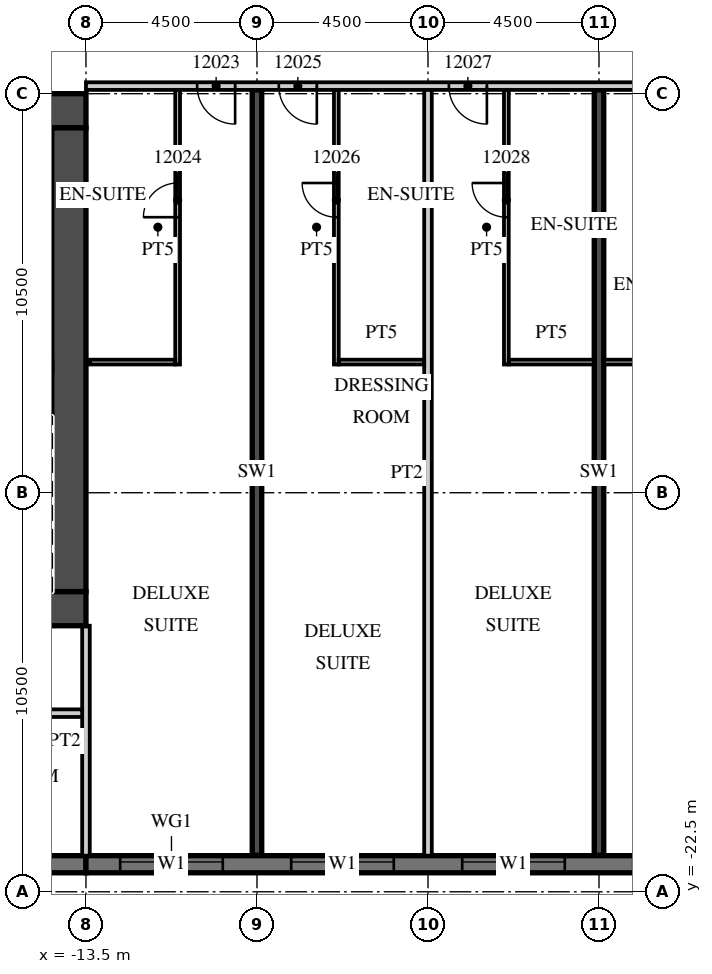
"""IFC4 building model, lengths in metres.
Left out: names, types, materials, properties, quantities, classifications, styles, units other than length and angle.
Written with IfcOpenShell. Run it as: python <this file> out.ifc"""

import sys

from ifc_helpers import new_model, si_unit, direction, frame, frame_2d, origin, place, context, subcontext, project, spatial, rectangle, extrude, element, fill, save


model = new_model("IFC4")
c1 = context("Model", 3, precision=1e-05, world=origin(), true_north=direction((0.0, 1.0)))
c2 = subcontext(c1, "Body", "Model", "MODEL_VIEW")
j1 = project(units=[si_unit("LENGTHUNIT", "METRE"), si_unit("PLANEANGLEUNIT", "RADIAN")], contexts=[c1])
p1 = place(None, origin())
s1 = spatial("IfcSite", under=j1, at=p1, CompositionType="ELEMENT")
p2 = place(p1, origin())
s2 = spatial("IfcBuilding", under=s1, at=p2, CompositionType="ELEMENT")
p3 = place(p2, frame((0.0, 0.0, 69.9)))
s3 = spatial("IfcBuildingStorey", under=s2, at=p3, CompositionType="ELEMENT", Elevation=69.9)
for number, where, z_axis, x_axis in (
    (1, (-9.0, -21.54, 0.0), (0.0, 0.0, 1.0), (0.0, 1.0, 0.0)),
    (2, (0.0, -21.54, 0.0), (0.0, 0.0, 1.0), (0.0, 1.0, 0.0)),
):
    element("IfcWall", number, at=place(p3, frame(where, z_axis=z_axis, x_axis=x_axis)), inside=s3, PredefinedType="SHEAR", context=c2, shape_type="SweptSolid", body=[
        extrude(rectangle(XDim=20.14, YDim=0.25, at=frame_2d((10.07, 0.0))), origin(), (0.0, 0.0, 1.0), 3.3),
    ])
p4 = place(p3, frame((-31.5, -21.775, 0.0), z_axis=(0.0, 0.0, 1.0), x_axis=(1.0, 0.0, 0.0)))
e3 = element("IfcWall", 3, at=p4, inside=s3, PredefinedType="SOLIDWALL", context=c2, shape_type="SweptSolid", body=[
    extrude(rectangle(XDim=18.0, YDim=0.45, at=frame_2d((9.0, 0.0))), origin(), (0.0, 0.0, 1.0), 3.02),
])
p5 = place(p3, frame((-13.5, -21.775, 0.0), z_axis=(0.0, 0.0, 1.0), x_axis=(1.0, 0.0, 0.0)))
e4 = element("IfcWall", 4, at=p5, inside=s3, PredefinedType="SOLIDWALL", context=c2, shape_type="SweptSolid", body=[
    extrude(rectangle(XDim=54.5, YDim=0.45, at=frame_2d((27.25, 0.0))), origin(), (0.0, 0.0, 1.0), 3.02),
])
p6 = place(p5, frame((0.9, 0.0, 0.45)))
e5 = element("IfcOpeningElement", 5, at=p6, cuts=e4, PredefinedType="OPENING", context=c2, shape_type="SweptSolid", body=[
    extrude(rectangle(XDim=2.7, YDim=2.25, at=frame_2d((1.35, 1.125))), frame((0.0, 0.235, 0.0), z_axis=(0.0, -1.0, 0.0), x_axis=(1.0, 0.0, 0.0)), (0.0, 0.0, 1.0), 0.47),
])
p7 = place(p5, frame((5.4, 0.0, 0.45)))
e6 = element("IfcOpeningElement", 6, at=p7, cuts=e4, PredefinedType="OPENING", context=c2, shape_type="SweptSolid", body=[
    extrude(rectangle(XDim=2.7, YDim=2.25, at=frame_2d((1.35, 1.125))), frame((0.0, 0.235, 0.0), z_axis=(0.0, -1.0, 0.0), x_axis=(1.0, 0.0, 0.0)), (0.0, 0.0, 1.0), 0.47),
])
p8 = place(p5, frame((9.9, 0.0, 0.45)))
e7 = element("IfcOpeningElement", 7, at=p8, cuts=e4, PredefinedType="OPENING", context=c2, shape_type="SweptSolid", body=[
    extrude(rectangle(XDim=2.7, YDim=2.25, at=frame_2d((1.35, 1.125))), frame((0.0, 0.235, 0.0), z_axis=(0.0, -1.0, 0.0), x_axis=(1.0, 0.0, 0.0)), (0.0, 0.0, 1.0), 0.47),
])
p9 = place(p5, frame((14.4, 0.0, 0.45)))
e8 = element("IfcOpeningElement", 8, at=p9, cuts=e4, PredefinedType="OPENING", context=c2, shape_type="SweptSolid", body=[
    extrude(rectangle(XDim=2.7, YDim=2.25, at=frame_2d((1.35, 1.125))), frame((0.0, 0.235, 0.0), z_axis=(0.0, -1.0, 0.0), x_axis=(1.0, 0.0, 0.0)), (0.0, 0.0, 1.0), 0.47),
])
p10 = place(p5, frame((18.9, 0.0, 0.45)))
e9 = element("IfcOpeningElement", 9, at=p10, cuts=e4, PredefinedType="OPENING", context=c2, shape_type="SweptSolid", body=[
    extrude(rectangle(XDim=2.7, YDim=2.25, at=frame_2d((1.35, 1.125))), frame((0.0, 0.235, 0.0), z_axis=(0.0, -1.0, 0.0), x_axis=(1.0, 0.0, 0.0)), (0.0, 0.0, 1.0), 0.47),
])
p11 = place(p5, frame((23.4, 0.0, 0.45)))
e10 = element("IfcOpeningElement", 10, at=p11, cuts=e4, PredefinedType="OPENING", context=c2, shape_type="SweptSolid", body=[
    extrude(rectangle(XDim=2.7, YDim=2.25, at=frame_2d((1.35, 1.125))), frame((0.0, 0.235, 0.0), z_axis=(0.0, -1.0, 0.0), x_axis=(1.0, 0.0, 0.0)), (0.0, 0.0, 1.0), 0.47),
])
p12 = place(p5, frame((27.9, 0.0, 0.45)))
e11 = element("IfcOpeningElement", 11, at=p12, cuts=e4, PredefinedType="OPENING", context=c2, shape_type="SweptSolid", body=[
    extrude(rectangle(XDim=2.7, YDim=2.25, at=frame_2d((1.35, 1.125))), frame((0.0, 0.235, 0.0), z_axis=(0.0, -1.0, 0.0), x_axis=(1.0, 0.0, 0.0)), (0.0, 0.0, 1.0), 0.47),
])
p13 = place(p5, frame((32.4, 0.0, 0.45)))
e12 = element("IfcOpeningElement", 12, at=p13, cuts=e4, PredefinedType="OPENING", context=c2, shape_type="SweptSolid", body=[
    extrude(rectangle(XDim=2.7, YDim=2.25, at=frame_2d((1.35, 1.125))), frame((0.0, 0.235, 0.0), z_axis=(0.0, -1.0, 0.0), x_axis=(1.0, 0.0, 0.0)), (0.0, 0.0, 1.0), 0.47),
])
p14 = place(p5, frame((36.9, 0.0, 0.45)))
e13 = element("IfcOpeningElement", 13, at=p14, cuts=e4, PredefinedType="OPENING", context=c2, shape_type="SweptSolid", body=[
    extrude(rectangle(XDim=2.7, YDim=2.25, at=frame_2d((1.35, 1.125))), frame((0.0, 0.235, 0.0), z_axis=(0.0, -1.0, 0.0), x_axis=(1.0, 0.0, 0.0)), (0.0, 0.0, 1.0), 0.47),
])
p15 = place(p5, frame((41.4, 0.0, 0.45)))
e14 = element("IfcOpeningElement", 14, at=p15, cuts=e4, PredefinedType="OPENING", context=c2, shape_type="SweptSolid", body=[
    extrude(rectangle(XDim=2.7, YDim=2.25, at=frame_2d((1.35, 1.125))), frame((0.0, 0.235, 0.0), z_axis=(0.0, -1.0, 0.0), x_axis=(1.0, 0.0, 0.0)), (0.0, 0.0, 1.0), 0.47),
])
p16 = place(p5, frame((45.9, 0.0, 0.45)))
e15 = element("IfcOpeningElement", 15, at=p16, cuts=e4, PredefinedType="OPENING", context=c2, shape_type="SweptSolid", body=[
    extrude(rectangle(XDim=2.7, YDim=2.25, at=frame_2d((1.35, 1.125))), frame((0.0, 0.235, 0.0), z_axis=(0.0, -1.0, 0.0), x_axis=(1.0, 0.0, 0.0)), (0.0, 0.0, 1.0), 0.47),
])
p17 = place(p5, frame((50.4, 0.0, 0.45)))
e16 = element("IfcOpeningElement", 16, at=p17, cuts=e4, PredefinedType="OPENING", context=c2, shape_type="SweptSolid", body=[
    extrude(rectangle(XDim=2.7, YDim=2.25, at=frame_2d((1.35, 1.125))), frame((0.0, 0.235, 0.0), z_axis=(0.0, -1.0, 0.0), x_axis=(1.0, 0.0, 0.0)), (0.0, 0.0, 1.0), 0.47),
])
p18 = place(p3, frame((-13.5, -21.55, 0.0), z_axis=(0.0, 0.0, 1.0), x_axis=(0.0, 1.0, 0.0)))
e17 = element("IfcWall", 17, at=p18, inside=s3, PredefinedType="PARTITIONING", context=c2, shape_type="SweptSolid", body=[
    extrude(rectangle(XDim=6.05, YDim=0.2, at=frame_2d((3.025, 0.0))), origin(), (0.0, 0.0, 1.0), 3.02),
])
p19 = place(p3, frame((-13.5, -1.3, 0.0), z_axis=(0.0, 0.0, 1.0), x_axis=(1.0, 0.0, 0.0)))
e18 = element("IfcWall", 18, at=p19, inside=s3, PredefinedType="PARTITIONING", context=c2, shape_type="SweptSolid", body=[
    extrude(rectangle(XDim=58.05, YDim=0.2, at=frame_2d((29.025, 0.0))), origin(), (0.0, 0.0, 1.0), 3.02),
])
p20 = place(p19, frame((2.925, 0.0, 0.0)))
e19 = element("IfcOpeningElement", 19, at=p20, cuts=e18, PredefinedType="OPENING", context=c2, shape_type="SweptSolid", body=[
    extrude(rectangle(XDim=1.0, YDim=2.1, at=frame_2d((0.5, 1.05))), frame((0.0, 0.11, 0.0), z_axis=(0.0, -1.0, 0.0), x_axis=(1.0, 0.0, 0.0)), (0.0, 0.0, 1.0), 0.22),
])
p21 = place(p19, frame((5.075, 0.0, 0.0)))
e20 = element("IfcOpeningElement", 20, at=p21, cuts=e18, PredefinedType="OPENING", context=c2, shape_type="SweptSolid", body=[
    extrude(rectangle(XDim=1.0, YDim=2.1, at=frame_2d((0.5, 1.05))), frame((0.0, 0.11, 0.0), z_axis=(0.0, -1.0, 0.0), x_axis=(1.0, 0.0, 0.0)), (0.0, 0.0, 1.0), 0.22),
])
p22 = place(p19, frame((9.55, 0.0, 0.0)))
e21 = element("IfcOpeningElement", 21, at=p22, cuts=e18, PredefinedType="OPENING", context=c2, shape_type="SweptSolid", body=[
    extrude(rectangle(XDim=1.0, YDim=2.1, at=frame_2d((0.5, 1.05))), frame((0.0, 0.11, 0.0), z_axis=(0.0, -1.0, 0.0), x_axis=(1.0, 0.0, 0.0)), (0.0, 0.0, 1.0), 0.22),
])
p23 = place(p19, frame((18.862, 0.0, 0.0)))
e22 = element("IfcOpeningElement", 22, at=p23, cuts=e18, PredefinedType="OPENING", context=c2, shape_type="SweptSolid", body=[
    extrude(rectangle(XDim=1.2, YDim=2.1, at=frame_2d((0.6, 1.05))), frame((0.0, 0.11, 0.0), z_axis=(0.0, -1.0, 0.0), x_axis=(1.0, 0.0, 0.0)), (0.0, 0.0, 1.0), 0.22),
])
p24 = place(p19, frame((27.862, 0.0, 0.0)))
e23 = element("IfcOpeningElement", 23, at=p24, cuts=e18, PredefinedType="OPENING", context=c2, shape_type="SweptSolid", body=[
    extrude(rectangle(XDim=1.2, YDim=2.1, at=frame_2d((0.6, 1.05))), frame((0.0, 0.11, 0.0), z_axis=(0.0, -1.0, 0.0), x_axis=(1.0, 0.0, 0.0)), (0.0, 0.0, 1.0), 0.22),
])
p25 = place(p19, frame((34.45, 0.0, 0.0)))
e24 = element("IfcOpeningElement", 24, at=p25, cuts=e18, PredefinedType="OPENING", context=c2, shape_type="SweptSolid", body=[
    extrude(rectangle(XDim=1.0, YDim=2.1, at=frame_2d((0.5, 1.05))), frame((0.0, 0.11, 0.0), z_axis=(0.0, -1.0, 0.0), x_axis=(1.0, 0.0, 0.0)), (0.0, 0.0, 1.0), 0.22),
])
p26 = place(p19, frame((38.925, 0.0, 0.0)))
e25 = element("IfcOpeningElement", 25, at=p26, cuts=e18, PredefinedType="OPENING", context=c2, shape_type="SweptSolid", body=[
    extrude(rectangle(XDim=1.0, YDim=2.1, at=frame_2d((0.5, 1.05))), frame((0.0, 0.11, 0.0), z_axis=(0.0, -1.0, 0.0), x_axis=(1.0, 0.0, 0.0)), (0.0, 0.0, 1.0), 0.22),
])
p27 = place(p19, frame((45.862, 0.0, 0.0)))
e26 = element("IfcOpeningElement", 26, at=p27, cuts=e18, PredefinedType="OPENING", context=c2, shape_type="SweptSolid", body=[
    extrude(rectangle(XDim=1.2, YDim=2.1, at=frame_2d((0.6, 1.05))), frame((0.0, 0.11, 0.0), z_axis=(0.0, -1.0, 0.0), x_axis=(1.0, 0.0, 0.0)), (0.0, 0.0, 1.0), 0.22),
])
p28 = place(p19, frame((50.075, 0.0, 0.0)))
e27 = element("IfcOpeningElement", 27, at=p28, cuts=e18, PredefinedType="OPENING", context=c2, shape_type="SweptSolid", body=[
    extrude(rectangle(XDim=1.0, YDim=2.1, at=frame_2d((0.5, 1.05))), frame((0.0, 0.11, 0.0), z_axis=(0.0, -1.0, 0.0), x_axis=(1.0, 0.0, 0.0)), (0.0, 0.0, 1.0), 0.22),
])
p29 = place(p19, frame((56.525, 0.0, 0.0)))
e28 = element("IfcOpeningElement", 28, at=p29, cuts=e18, PredefinedType="OPENING", context=c2, shape_type="SweptSolid", body=[
    extrude(rectangle(XDim=1.0, YDim=2.1, at=frame_2d((0.5, 1.05))), frame((0.0, 0.11, 0.0), z_axis=(0.0, -1.0, 0.0), x_axis=(1.0, 0.0, 0.0)), (0.0, 0.0, 1.0), 0.22),
])
p30 = place(p3, frame((-11.088, -8.625, 0.0), z_axis=(0.0, 0.0, 1.0), x_axis=(0.0, 1.0, 0.0)))
e29 = element("IfcWall", 29, at=p30, inside=s3, PredefinedType="PARTITIONING", context=c2, shape_type="SweptSolid", body=[
    extrude(rectangle(XDim=7.225, YDim=0.125, at=frame_2d((3.613, 0.0))), origin(), (0.0, 0.0, 1.0), 3.02),
])
p31 = place(p30, frame((3.875, 0.0, 0.0)))
e30 = element("IfcOpeningElement", 30, at=p31, cuts=e29, PredefinedType="OPENING", context=c2, shape_type="SweptSolid", body=[
    extrude(rectangle(XDim=0.9, YDim=2.1, at=frame_2d((0.45, 1.05))), frame((0.0, 0.073, 0.0), z_axis=(0.0, -1.0, 0.0), x_axis=(1.0, 0.0, 0.0)), (0.0, 0.0, 1.0), 0.145),
])
p32 = place(p3, frame((-13.4, -8.562, 0.0), z_axis=(0.0, 0.0, 1.0), x_axis=(1.0, 0.0, 0.0)))
e31 = element("IfcWall", 31, at=p32, inside=s3, PredefinedType="PARTITIONING", context=c2, shape_type="SweptSolid", body=[
    extrude(rectangle(XDim=2.25, YDim=0.125, at=frame_2d((1.125, 0.0))), origin(), (0.0, 0.0, 1.0), 3.02),
])
p33 = place(p3, frame((-4.5, -21.55, 0.0), z_axis=(0.0, 0.0, 1.0), x_axis=(0.0, 1.0, 0.0)))
e32 = element("IfcWall", 32, at=p33, inside=s3, PredefinedType="PARTITIONING", context=c2, shape_type="SweptSolid", body=[
    extrude(rectangle(XDim=20.15, YDim=0.2, at=frame_2d((10.075, 0.0))), origin(), (0.0, 0.0, 1.0), 3.02),
])
p34 = place(p3, frame((-6.912, -8.625, 0.0), z_axis=(0.0, 0.0, 1.0), x_axis=(0.0, 1.0, 0.0)))
e33 = element("IfcWall", 33, at=p34, inside=s3, PredefinedType="PARTITIONING", context=c2, shape_type="SweptSolid", body=[
    extrude(rectangle(XDim=7.225, YDim=0.125, at=frame_2d((3.613, 0.0))), origin(), (0.0, 0.0, 1.0), 3.02),
])
p35 = place(p34, frame((3.875, 0.0, 0.0)))
e34 = element("IfcOpeningElement", 34, at=p35, cuts=e33, PredefinedType="OPENING", context=c2, shape_type="SweptSolid", body=[
    extrude(rectangle(XDim=0.9, YDim=2.1, at=frame_2d((0.45, 1.05))), frame((0.0, 0.073, 0.0), z_axis=(0.0, -1.0, 0.0), x_axis=(1.0, 0.0, 0.0)), (0.0, 0.0, 1.0), 0.145),
])
p36 = place(p3, frame((-6.85, -8.562, 0.0), z_axis=(0.0, 0.0, 1.0), x_axis=(1.0, 0.0, 0.0)))
e35 = element("IfcWall", 35, at=p36, inside=s3, PredefinedType="PARTITIONING", context=c2, shape_type="SweptSolid", body=[
    extrude(rectangle(XDim=2.25, YDim=0.125, at=frame_2d((1.125, 0.0))), origin(), (0.0, 0.0, 1.0), 3.02),
])
p37 = place(p3, frame((-2.438, -8.625, 0.0), z_axis=(0.0, 0.0, 1.0), x_axis=(0.0, 1.0, 0.0)))
e36 = element("IfcWall", 36, at=p37, inside=s3, PredefinedType="PARTITIONING", context=c2, shape_type="SweptSolid", body=[
    extrude(rectangle(XDim=7.225, YDim=0.125, at=frame_2d((3.613, 0.0))), origin(), (0.0, 0.0, 1.0), 3.02),
])
p38 = place(p37, frame((3.875, 0.0, 0.0)))
e37 = element("IfcOpeningElement", 37, at=p38, cuts=e36, PredefinedType="OPENING", context=c2, shape_type="SweptSolid", body=[
    extrude(rectangle(XDim=0.9, YDim=2.1, at=frame_2d((0.45, 1.05))), frame((0.0, 0.073, 0.0), z_axis=(0.0, -1.0, 0.0), x_axis=(1.0, 0.0, 0.0)), (0.0, 0.0, 1.0), 0.145),
])
p39 = place(p3, frame((-2.375, -8.562, 0.0), z_axis=(0.0, 0.0, 1.0), x_axis=(1.0, 0.0, 0.0)))
e38 = element("IfcWall", 38, at=p39, inside=s3, PredefinedType="PARTITIONING", context=c2, shape_type="SweptSolid", body=[
    extrude(rectangle(XDim=2.25, YDim=0.125, at=frame_2d((1.125, 0.0))), origin(), (0.0, 0.0, 1.0), 3.02),
])
p40 = place(p3, frame((0.125, -8.562, 0.0), z_axis=(0.0, 0.0, 1.0), x_axis=(1.0, 0.0, 0.0)))
e39 = element("IfcWall", 39, at=p40, inside=s3, PredefinedType="PARTITIONING", context=c2, shape_type="SweptSolid", body=[
    extrude(rectangle(XDim=2.8, YDim=0.125, at=frame_2d((1.4, 0.0))), origin(), (0.0, 0.0, 1.0), 3.02),
])
p41 = place(p3, frame((-31.5, -1.95, 0.0), z_axis=(0.0, 0.0, 1.0), x_axis=(1.0, 0.0, 0.0)))
e40 = element("IfcWall", 40, at=p41, inside=s3, PredefinedType="SHEAR", context=c2, shape_type="SweptSolid", body=[
    extrude(rectangle(XDim=18.0, YDim=0.9, at=frame_2d((9.0, 0.0))), origin(), (0.0, 0.0, 1.0), 3.02),
])
p42 = place(p41, frame((14.725, 0.0, 0.0)))
e41 = element("IfcOpeningElement", 41, at=p42, cuts=e40, PredefinedType="OPENING", context=c2, shape_type="SweptSolid", body=[
    extrude(rectangle(XDim=1.8, YDim=2.1, at=frame_2d((0.9, 1.05))), frame((0.0, 0.46, 0.0), z_axis=(0.0, -1.0, 0.0), x_axis=(1.0, 0.0, 0.0)), (0.0, 0.0, 1.0), 0.92),
])
p43 = place(p3, frame((-20.3, -15.05, 0.0), z_axis=(0.0, 0.0, 1.0), x_axis=(1.0, 0.0, 0.0)))
e42 = element("IfcWall", 42, at=p43, inside=s3, PredefinedType="SHEAR", context=c2, shape_type="SweptSolid", body=[
    extrude(rectangle(XDim=6.8, YDim=0.9, at=frame_2d((3.4, 0.0))), origin(), (0.0, 0.0, 1.0), 3.02),
])
p44 = place(p43, frame((0.875, 0.0, 0.0)))
e43 = element("IfcOpeningElement", 43, at=p44, cuts=e42, PredefinedType="OPENING", context=c2, shape_type="SweptSolid", body=[
    extrude(rectangle(XDim=1.2, YDim=2.1, at=frame_2d((0.6, 1.05))), frame((0.0, 0.46, 0.0), z_axis=(0.0, -1.0, 0.0), x_axis=(1.0, 0.0, 0.0)), (0.0, 0.0, 1.0), 0.92),
])
p45 = place(p3, frame((-13.95, -14.6, 0.0), z_axis=(0.0, 0.0, 1.0), x_axis=(0.0, 1.0, 0.0)))
e44 = element("IfcWall", 44, at=p45, inside=s3, PredefinedType="SHEAR", context=c2, shape_type="SweptSolid", body=[
    extrude(rectangle(XDim=12.2, YDim=0.9, at=frame_2d((6.1, 0.0))), origin(), (0.0, 0.0, 1.0), 3.02),
])
p46 = place(p3, frame((-44.55, -17.8, 0.0), z_axis=(0.0, 0.0, 1.0), x_axis=(1.0, 0.0, 0.0)))
e45 = element("IfcWall", 45, at=p46, inside=s3, PredefinedType="PARTITIONING", context=c2, shape_type="SweptSolid", body=[
    extrude(rectangle(XDim=30.95, YDim=0.2, at=frame_2d((15.475, 0.0))), origin(), (0.0, 0.0, 1.0), 3.02),
])
p47 = place(p46, frame((13.438, 0.0, 0.0)))
e46 = element("IfcOpeningElement", 46, at=p47, cuts=e45, PredefinedType="OPENING", context=c2, shape_type="SweptSolid", body=[
    extrude(rectangle(XDim=0.9, YDim=2.1, at=frame_2d((0.45, 1.05))), frame((0.0, 0.11, 0.0), z_axis=(0.0, -1.0, 0.0), x_axis=(1.0, 0.0, 0.0)), (0.0, 0.0, 1.0), 0.22),
])
p48 = place(p46, frame((21.738, 0.0, 0.0)))
e47 = element("IfcOpeningElement", 47, at=p48, cuts=e45, PredefinedType="OPENING", context=c2, shape_type="SweptSolid", body=[
    extrude(rectangle(XDim=0.9, YDim=2.1, at=frame_2d((0.45, 1.05))), frame((0.0, 0.11, 0.0), z_axis=(0.0, -1.0, 0.0), x_axis=(1.0, 0.0, 0.0)), (0.0, 0.0, 1.0), 0.22),
])
p49 = place(p6, origin())
e48 = element("IfcWindow", 48, at=p49, inside=s3, PartitioningType="SINGLE_PANEL", PredefinedType="WINDOW", context=c2, shape_type="SweptSolid", body=[
    extrude(rectangle(XDim=2.7, YDim=2.25, at=frame_2d((1.35, 1.125))), frame((0.0, 0.09, 0.0), z_axis=(0.0, -1.0, 0.0), x_axis=(1.0, 0.0, 0.0)), (0.0, 0.0, 1.0), 0.06),
])
fill(e5, e48)
p50 = place(p7, origin())
e49 = element("IfcWindow", 49, at=p50, inside=s3, PartitioningType="SINGLE_PANEL", PredefinedType="WINDOW", context=c2, shape_type="SweptSolid", body=[
    extrude(rectangle(XDim=2.7, YDim=2.25, at=frame_2d((1.35, 1.125))), frame((0.0, 0.09, 0.0), z_axis=(0.0, -1.0, 0.0), x_axis=(1.0, 0.0, 0.0)), (0.0, 0.0, 1.0), 0.06),
])
fill(e6, e49)
p51 = place(p8, origin())
e50 = element("IfcWindow", 50, at=p51, inside=s3, PartitioningType="SINGLE_PANEL", PredefinedType="WINDOW", context=c2, shape_type="SweptSolid", body=[
    extrude(rectangle(XDim=2.7, YDim=2.25, at=frame_2d((1.35, 1.125))), frame((0.0, 0.09, 0.0), z_axis=(0.0, -1.0, 0.0), x_axis=(1.0, 0.0, 0.0)), (0.0, 0.0, 1.0), 0.06),
])
fill(e7, e50)
p52 = place(p20, origin())
e51 = element("IfcDoor", 51, at=p52, inside=s3, OperationType="SINGLE_SWING_RIGHT", PredefinedType="DOOR", context=c2, shape_type="SweptSolid", body=[
    extrude(rectangle(XDim=1.0, YDim=2.1, at=frame_2d((0.5, 1.05))), frame((0.0, 0.025, 0.0), z_axis=(0.0, -1.0, 0.0), x_axis=(1.0, 0.0, 0.0)), (0.0, 0.0, 1.0), 0.05),
])
fill(e19, e51)
p53 = place(p31, origin())
e52 = element("IfcDoor", 52, at=p53, inside=s3, OperationType="SINGLE_SWING_LEFT", PredefinedType="DOOR", context=c2, shape_type="SweptSolid", body=[
    extrude(rectangle(XDim=0.9, YDim=2.1, at=frame_2d((0.45, 1.05))), frame((0.0, 0.025, 0.0), z_axis=(0.0, -1.0, 0.0), x_axis=(1.0, 0.0, 0.0)), (0.0, 0.0, 1.0), 0.05),
])
fill(e30, e52)
p54 = place(p21, origin())
e53 = element("IfcDoor", 53, at=p54, inside=s3, OperationType="SINGLE_SWING_RIGHT", PredefinedType="DOOR", context=c2, shape_type="SweptSolid", body=[
    extrude(rectangle(XDim=1.0, YDim=2.1, at=frame_2d((0.5, 1.05))), frame((0.0, 0.025, 0.0), z_axis=(0.0, -1.0, 0.0), x_axis=(1.0, 0.0, 0.0)), (0.0, 0.0, 1.0), 0.05),
])
fill(e20, e53)
p55 = place(p35, origin())
e54 = element("IfcDoor", 54, at=p55, inside=s3, OperationType="SINGLE_SWING_RIGHT", PredefinedType="DOOR", context=c2, shape_type="SweptSolid", body=[
    extrude(rectangle(XDim=0.9, YDim=2.1, at=frame_2d((0.45, 1.05))), frame((0.0, 0.025, 0.0), z_axis=(0.0, -1.0, 0.0), x_axis=(1.0, 0.0, 0.0)), (0.0, 0.0, 1.0), 0.05),
])
fill(e34, e54)
p56 = place(p22, origin())
e55 = element("IfcDoor", 55, at=p56, inside=s3, OperationType="SINGLE_SWING_RIGHT", PredefinedType="DOOR", context=c2, shape_type="SweptSolid", body=[
    extrude(rectangle(XDim=1.0, YDim=2.1, at=frame_2d((0.5, 1.05))), frame((0.0, 0.025, 0.0), z_axis=(0.0, -1.0, 0.0), x_axis=(1.0, 0.0, 0.0)), (0.0, 0.0, 1.0), 0.05),
])
fill(e21, e55)
p57 = place(p38, origin())
e56 = element("IfcDoor", 56, at=p57, inside=s3, OperationType="SINGLE_SWING_RIGHT", PredefinedType="DOOR", context=c2, shape_type="SweptSolid", body=[
    extrude(rectangle(XDim=0.9, YDim=2.1, at=frame_2d((0.45, 1.05))), frame((0.0, 0.025, 0.0), z_axis=(0.0, -1.0, 0.0), x_axis=(1.0, 0.0, 0.0)), (0.0, 0.0, 1.0), 0.05),
])
fill(e37, e56)
save(model, sys.argv[1])
